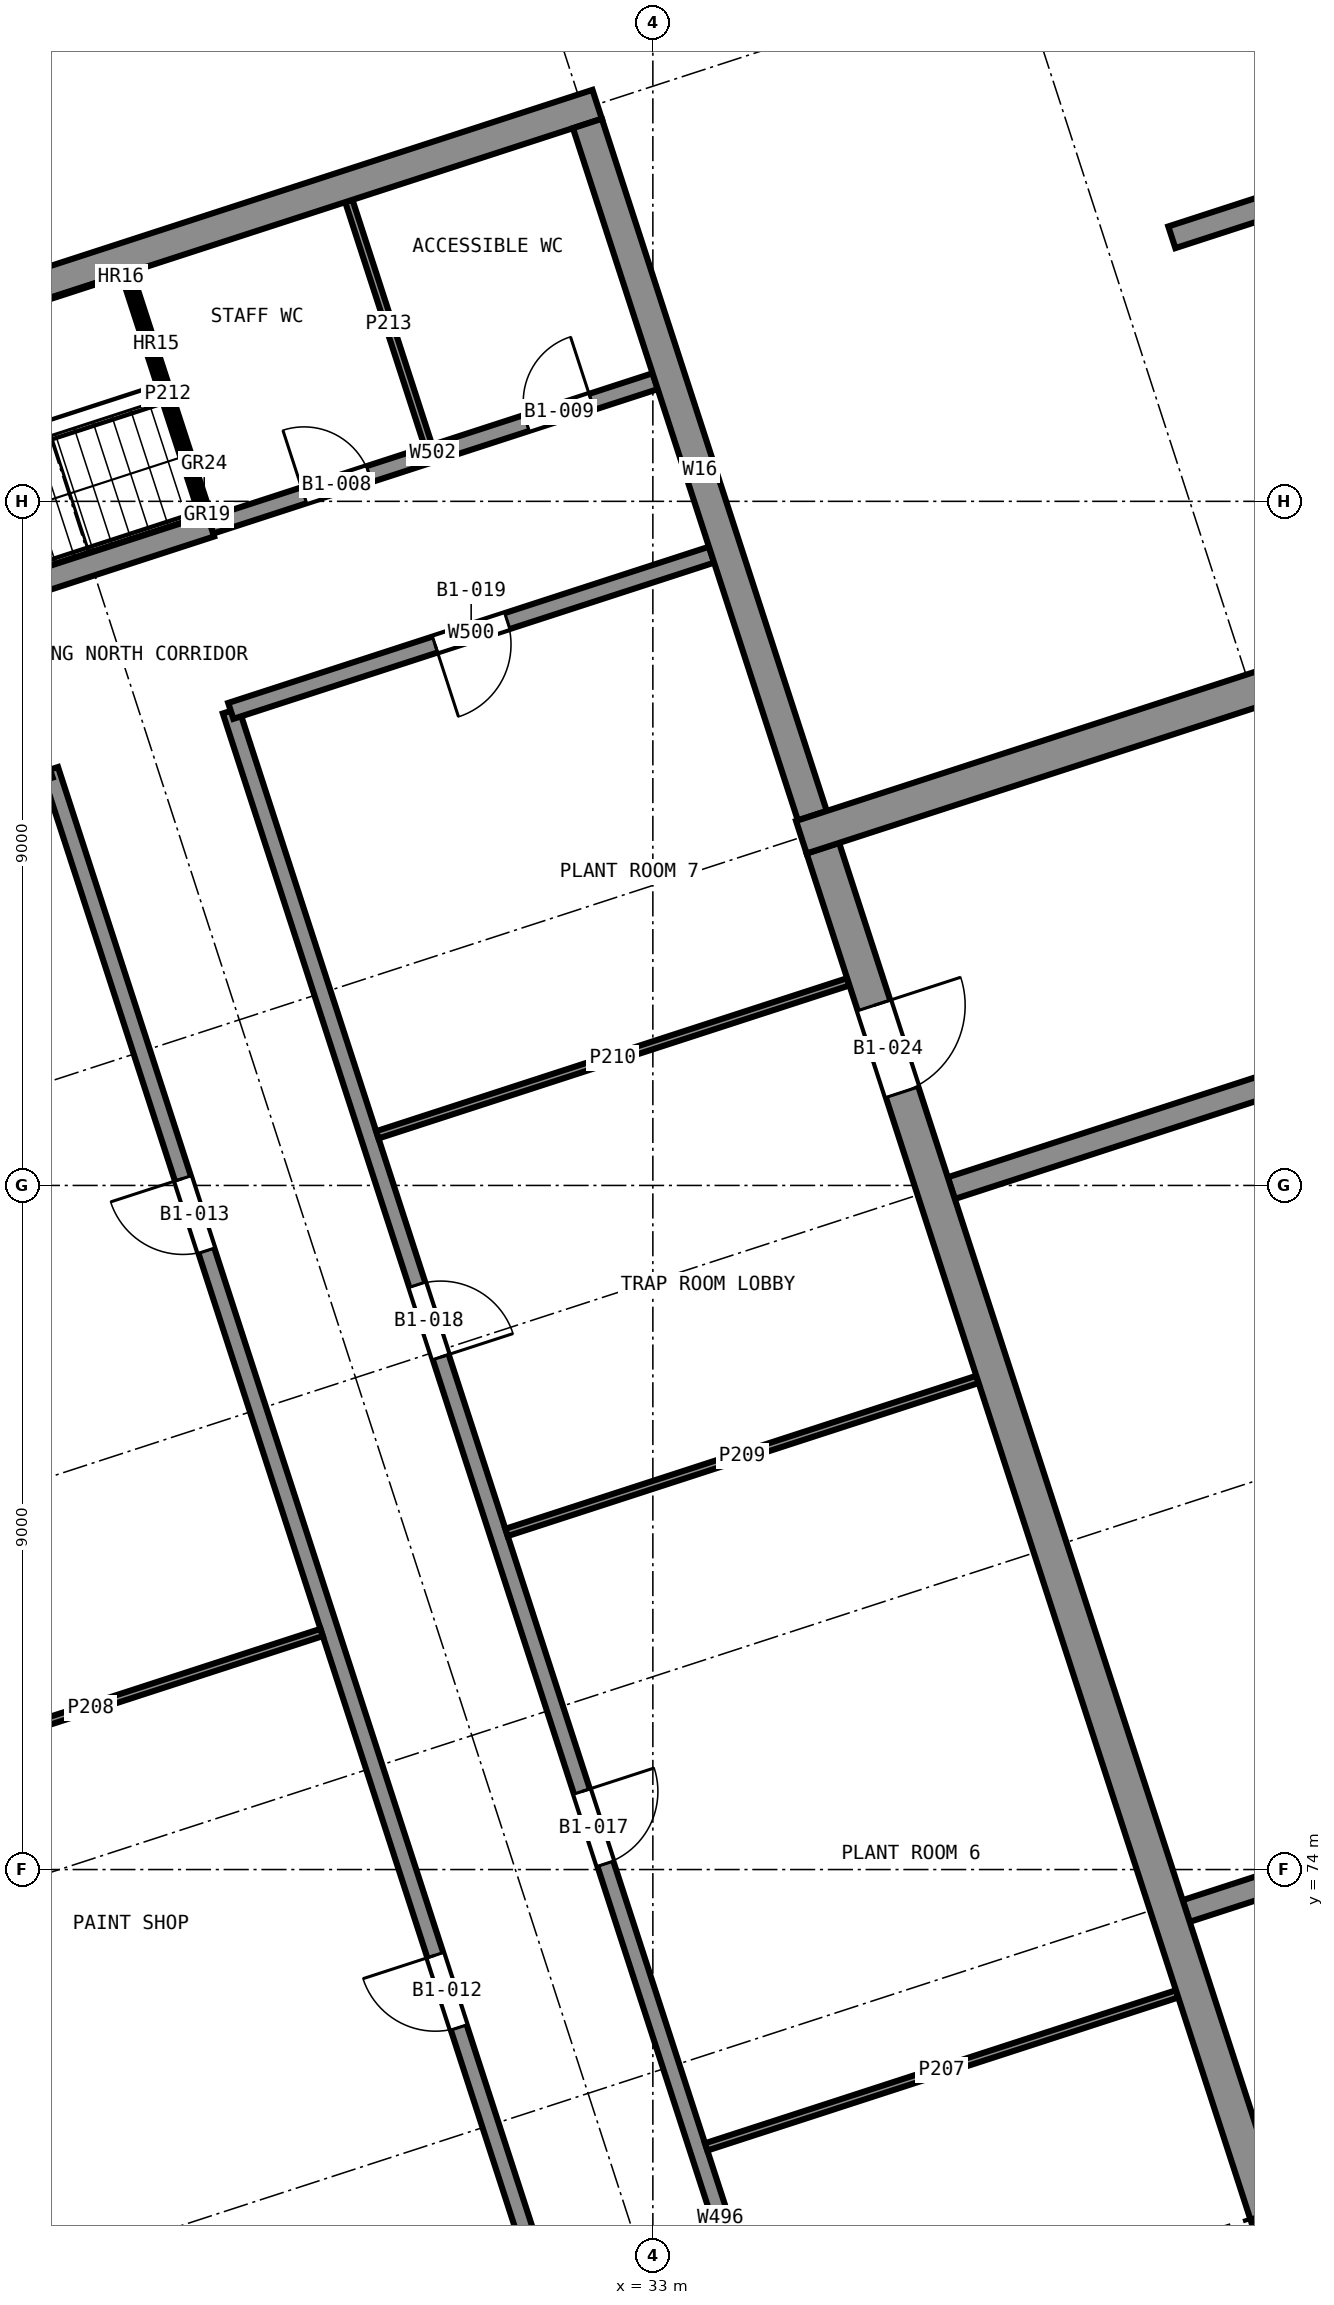
"""IFC4 building model, lengths in metres.
Left out: names, types, materials, properties, quantities, classifications, styles, units other than length and angle.
Written with IfcOpenShell. Run it as: python <this file> out.ifc"""

import sys

from ifc_helpers import new_model, si_unit, direction, frame, frame_2d, origin, place, context, subcontext, project, spatial, rectangle, extrude, element, fill, save


model = new_model("IFC4")
c1 = context("Model", 3, precision=1e-05, world=origin(), true_north=direction((0.0, 1.0)))
c2 = subcontext(c1, "Body", "Model", "MODEL_VIEW")
j1 = project(units=[si_unit("LENGTHUNIT", "METRE"), si_unit("PLANEANGLEUNIT", "RADIAN")], contexts=[c1])
p1 = place(None, origin())
s1 = spatial("IfcSite", under=j1, at=p1, CompositionType="ELEMENT")
p2 = place(p1, origin())
s2 = spatial("IfcBuilding", under=s1, at=p2, CompositionType="ELEMENT")
p3 = place(p2, frame((0.0, 0.0, -5.0)))
s3 = spatial("IfcBuildingStorey", under=s2, at=p3, CompositionType="ELEMENT", Elevation=-5.0)
p4 = place(p3, frame((49.93, 42.214, 0.0), z_axis=(0.0, 0.0, 1.0), x_axis=(-0.309013046462, 0.951057799041, 0.0)))
e1 = element("IfcWall", 1, at=p4, inside=s3, PredefinedType="SHEAR", context=c2, shape_type="SweptSolid", body=[
    extrude(rectangle(XDim=47.55, YDim=0.45, at=frame_2d((23.775, 0.0))), origin(), (0.0, 0.0, 1.0), 5.0),
])
p5 = place(p4, frame((11.775, 0.0, 0.0)))
e2 = element("IfcOpeningElement", 2, at=p5, cuts=e1, PredefinedType="OPENING", context=c2, shape_type="SweptSolid", body=[
    extrude(rectangle(XDim=1.2, YDim=2.1, at=frame_2d((0.6, 1.05))), frame((0.0, 0.235, 0.0), z_axis=(0.0, -1.0, 0.0), x_axis=(1.0, 0.0, 0.0)), (0.0, 0.0, 1.0), 0.47),
])
p6 = place(p4, frame((44.175, 0.0, 0.0)))
e3 = element("IfcOpeningElement", 3, at=p6, cuts=e1, PredefinedType="OPENING", context=c2, shape_type="SweptSolid", body=[
    extrude(rectangle(XDim=1.2, YDim=2.1, at=frame_2d((0.6, 1.05))), frame((0.0, 0.235, 0.0), z_axis=(0.0, -1.0, 0.0), x_axis=(1.0, 0.0, 0.0)), (0.0, 0.0, 1.0), 0.47),
])
p7 = place(p3, frame((34.953, 87.581, 0.0), z_axis=(0.0, 0.0, 1.0), x_axis=(0.951059165148, 0.309008841924, 0.0)))
e4 = element("IfcWall", 4, at=p7, inside=s3, PredefinedType="SHEAR", context=c2, shape_type="SweptSolid", body=[
    extrude(rectangle(XDim=29.45, YDim=0.45, at=frame_2d((14.725, 0.0))), origin(), (0.0, 0.0, 1.0), 5.0),
])
p8 = place(p3, frame((33.438, 41.035, 0.0), z_axis=(0.0, 0.0, 1.0), x_axis=(-0.309020156104, 0.951055488981, 0.0)))
e5 = element("IfcWall", 5, at=p8, inside=s3, PredefinedType="SOLIDWALL", context=c2, shape_type="SweptSolid", body=[
    extrude(rectangle(XDim=53.6, YDim=0.4, at=frame_2d((26.8, 0.0))), origin(), (0.0, 0.0, 1.0), 5.0),
])
p9 = place(p3, frame((16.622, 92.14, 0.0), z_axis=(0.0, 0.0, 1.0), x_axis=(0.951054352744, 0.30902365302, 0.0)))
e6 = element("IfcWall", 6, at=p9, inside=s3, PredefinedType="SOLIDWALL", context=c2, shape_type="SweptSolid", body=[
    extrude(rectangle(XDim=16.45, YDim=0.4, at=frame_2d((8.225, 0.0))), origin(), (0.0, 0.0, 1.0), 5.0),
])
p10 = place(p3, frame((32.139, 96.971, 0.0), z_axis=(0.0, 0.0, 1.0), x_axis=(0.30901284874, -0.951057863284, 0.0)))
e7 = element("IfcWall", 7, at=p10, inside=s3, PredefinedType="SOLIDWALL", context=c2, shape_type="SweptSolid", body=[
    extrude(rectangle(XDim=9.575, YDim=0.4, at=frame_2d((4.787, 0.0))), origin(), (0.0, 0.0, 1.0), 5.0),
])
p11 = place(p3, frame((27.181, 91.68, 0.0), z_axis=(0.0, 0.0, 1.0), x_axis=(-0.951051301895, -0.309033042189, 0.0)))
e8 = element("IfcWall", 8, at=p11, inside=s3, PredefinedType="SOLIDWALL", context=c2, shape_type="SweptSolid", body=[
    extrude(rectangle(XDim=6.35, YDim=0.3, at=frame_2d((3.175, 0.0))), origin(), (0.0, 0.0, 1.0), 4.6),
])
p12 = place(p11, frame((4.85, 0.0, 0.0)))
e9 = element("IfcOpeningElement", 9, at=p12, cuts=e8, PredefinedType="OPENING", context=c2, shape_type="SweptSolid", body=[
    extrude(rectangle(XDim=1.0, YDim=2.1, at=frame_2d((0.5, 1.05))), frame((0.0, 0.16, 0.0), z_axis=(0.0, -1.0, 0.0), x_axis=(1.0, 0.0, 0.0)), (0.0, 0.0, 1.0), 0.32),
])
for number, where, z_axis, x_axis in (
    (10, (40.016, 73.454, 0.0), (0.0, 0.0, 1.0), (0.951, 0.309, 0.0)),
    (11, (46.365, 86.032, 0.0), (0.0, 0.0, 1.0), (-0.951, -0.309, 0.0)),
):
    element("IfcWall", number, at=place(p3, frame(where, z_axis=z_axis, x_axis=x_axis)), inside=s3, PredefinedType="SOLIDWALL", context=c2, shape_type="SweptSolid", body=[
        extrude(rectangle(XDim=9.925, YDim=0.3, at=frame_2d((4.962, 0.0))), origin(), (0.0, 0.0, 1.0), 4.6),
    ])
p13 = place(p3, frame((37.956, 48.812, 0.0), z_axis=(0.0, 0.0, 1.0), x_axis=(-0.30901736393, 0.951056396219, 0.0)))
e12 = element("IfcWall", 12, at=p13, inside=s3, PredefinedType="SOLIDWALL", context=c2, shape_type="SweptSolid", body=[
    extrude(rectangle(XDim=41.7, YDim=0.22, at=frame_2d((20.85, 0.0))), origin(), (0.0, 0.0, 1.0), 4.6),
])
p14 = place(p13, frame((2.009, 0.0, 0.0)))
e13 = element("IfcOpeningElement", 13, at=p14, cuts=e12, PredefinedType="OPENING", context=c2, shape_type="SweptSolid", body=[
    extrude(rectangle(XDim=1.0, YDim=2.1, at=frame_2d((0.5, 1.05))), frame((0.0, 0.12, 0.0), z_axis=(0.0, -1.0, 0.0), x_axis=(1.0, 0.0, 0.0)), (0.0, 0.0, 1.0), 0.24),
])
p15 = place(p13, frame((11.495, 0.0, 0.0)))
e14 = element("IfcOpeningElement", 14, at=p15, cuts=e12, PredefinedType="OPENING", context=c2, shape_type="SweptSolid", body=[
    extrude(rectangle(XDim=1.0, YDim=2.1, at=frame_2d((0.5, 1.05))), frame((0.0, 0.12, 0.0), z_axis=(0.0, -1.0, 0.0), x_axis=(1.0, 0.0, 0.0)), (0.0, 0.0, 1.0), 0.24),
])
p16 = place(p13, frame((24.3, 0.0, 0.0)))
e15 = element("IfcOpeningElement", 15, at=p16, cuts=e12, PredefinedType="OPENING", context=c2, shape_type="SweptSolid", body=[
    extrude(rectangle(XDim=1.0, YDim=2.1, at=frame_2d((0.5, 1.05))), frame((0.0, 0.12, 0.0), z_axis=(0.0, -1.0, 0.0), x_axis=(1.0, 0.0, 0.0)), (0.0, 0.0, 1.0), 0.24),
])
p17 = place(p13, frame((35.045, 0.0, 0.0)))
e16 = element("IfcOpeningElement", 16, at=p17, cuts=e12, PredefinedType="OPENING", context=c2, shape_type="SweptSolid", body=[
    extrude(rectangle(XDim=1.0, YDim=2.1, at=frame_2d((0.5, 1.05))), frame((0.0, 0.12, 0.0), z_axis=(0.0, -1.0, 0.0), x_axis=(1.0, 0.0, 0.0)), (0.0, 0.0, 1.0), 0.24),
])
p18 = place(p3, frame((40.333, 49.584, 0.0), z_axis=(0.0, 0.0, 1.0), x_axis=(-0.309015643281, 0.951056955291, 0.0)))
e17 = element("IfcWall", 17, at=p18, inside=s3, PredefinedType="SOLIDWALL", context=c2, shape_type="SweptSolid", body=[
    extrude(rectangle(XDim=41.7, YDim=0.22, at=frame_2d((20.85, 0.0))), origin(), (0.0, 0.0, 1.0), 4.6),
])
p19 = place(p18, frame((2.0, 0.0, 0.0)))
e18 = element("IfcOpeningElement", 18, at=p19, cuts=e17, PredefinedType="OPENING", context=c2, shape_type="SweptSolid", body=[
    extrude(rectangle(XDim=1.0, YDim=2.1, at=frame_2d((0.5, 1.05))), frame((0.0, 0.12, 0.0), z_axis=(0.0, -1.0, 0.0), x_axis=(1.0, 0.0, 0.0)), (0.0, 0.0, 1.0), 0.24),
])
p20 = place(p18, frame((8.285, 0.0, 0.0)))
e19 = element("IfcOpeningElement", 19, at=p20, cuts=e17, PredefinedType="OPENING", context=c2, shape_type="SweptSolid", body=[
    extrude(rectangle(XDim=1.0, YDim=2.1, at=frame_2d((0.5, 1.05))), frame((0.0, 0.12, 0.0), z_axis=(0.0, -1.0, 0.0), x_axis=(1.0, 0.0, 0.0)), (0.0, 0.0, 1.0), 0.24),
])
p21 = place(p18, frame((16.475, 0.0, 0.0)))
e20 = element("IfcOpeningElement", 20, at=p21, cuts=e17, PredefinedType="OPENING", context=c2, shape_type="SweptSolid", body=[
    extrude(rectangle(XDim=1.0, YDim=2.1, at=frame_2d((0.5, 1.05))), frame((0.0, 0.12, 0.0), z_axis=(0.0, -1.0, 0.0), x_axis=(1.0, 0.0, 0.0)), (0.0, 0.0, 1.0), 0.24),
])
p22 = place(p18, frame((25.752, 0.0, 0.0)))
e21 = element("IfcOpeningElement", 21, at=p22, cuts=e17, PredefinedType="OPENING", context=c2, shape_type="SweptSolid", body=[
    extrude(rectangle(XDim=1.0, YDim=2.1, at=frame_2d((0.5, 1.05))), frame((0.0, 0.12, 0.0), z_axis=(0.0, -1.0, 0.0), x_axis=(1.0, 0.0, 0.0)), (0.0, 0.0, 1.0), 0.24),
])
p23 = place(p18, frame((32.761, 0.0, 0.0)))
e22 = element("IfcOpeningElement", 22, at=p23, cuts=e17, PredefinedType="OPENING", context=c2, shape_type="SweptSolid", body=[
    extrude(rectangle(XDim=1.0, YDim=2.1, at=frame_2d((0.5, 1.05))), frame((0.0, 0.12, 0.0), z_axis=(0.0, -1.0, 0.0), x_axis=(1.0, 0.0, 0.0)), (0.0, 0.0, 1.0), 0.24),
])
p24 = place(p3, frame((18.888, 86.462, 0.0), z_axis=(0.0, 0.0, 1.0), x_axis=(0.951059735424, 0.30900708674, 0.0)))
e23 = element("IfcWall", 23, at=p24, inside=s3, PredefinedType="SOLIDWALL", context=c2, shape_type="SweptSolid", body=[
    extrude(rectangle(XDim=6.5, YDim=0.22, at=frame_2d((3.25, 0.0))), origin(), (0.0, 0.0, 1.0), 4.6),
])
p25 = place(p3, frame((27.447, 89.243, 0.0), z_axis=(0.0, 0.0, 1.0), x_axis=(0.95105699893, 0.309015508975, 0.0)))
e24 = element("IfcWall", 24, at=p25, inside=s3, PredefinedType="SOLIDWALL", context=c2, shape_type="SweptSolid", body=[
    extrude(rectangle(XDim=6.65, YDim=0.22, at=frame_2d((3.325, 0.0))), origin(), (0.0, 0.0, 1.0), 4.6),
])
p26 = place(p25, frame((2.825, 0.0, 0.0)))
e25 = element("IfcOpeningElement", 25, at=p26, cuts=e24, PredefinedType="OPENING", context=c2, shape_type="SweptSolid", body=[
    extrude(rectangle(XDim=1.0, YDim=2.1, at=frame_2d((0.5, 1.05))), frame((0.0, 0.12, 0.0), z_axis=(0.0, -1.0, 0.0), x_axis=(1.0, 0.0, 0.0)), (0.0, 0.0, 1.0), 0.24),
])
p27 = place(p3, frame((27.181, 91.68, 0.0), z_axis=(0.0, 0.0, 1.0), x_axis=(0.951061487132, 0.309001695293, 0.0)))
e26 = element("IfcWall", 26, at=p27, inside=s3, PredefinedType="SOLIDWALL", context=c2, shape_type="SweptSolid", body=[
    extrude(rectangle(XDim=6.15, YDim=0.22, at=frame_2d((3.075, 0.0))), origin(), (0.0, 0.0, 1.0), 4.6),
])
p28 = place(p27, frame((1.293, 0.0, 0.0)))
e27 = element("IfcOpeningElement", 27, at=p28, cuts=e26, PredefinedType="OPENING", context=c2, shape_type="SweptSolid", body=[
    extrude(rectangle(XDim=0.9, YDim=2.1, at=frame_2d((0.45, 1.05))), frame((0.0, 0.12, 0.0), z_axis=(0.0, -1.0, 0.0), x_axis=(1.0, 0.0, 0.0)), (0.0, 0.0, 1.0), 0.24),
])
p29 = place(p27, frame((4.371, 0.0, 0.0)))
e28 = element("IfcOpeningElement", 28, at=p29, cuts=e26, PredefinedType="OPENING", context=c2, shape_type="SweptSolid", body=[
    extrude(rectangle(XDim=0.9, YDim=2.1, at=frame_2d((0.45, 1.05))), frame((0.0, 0.12, 0.0), z_axis=(0.0, -1.0, 0.0), x_axis=(1.0, 0.0, 0.0)), (0.0, 0.0, 1.0), 0.24),
])
p30 = place(p3, frame((33.701, 70.351, 0.0), z_axis=(0.0, 0.0, 1.0), x_axis=(0.951058024796, 0.309012351648, 0.0)))
e29 = element("IfcWall", 29, at=p30, inside=s3, PredefinedType="PARTITIONING", context=c2, shape_type="SweptSolid", body=[
    extrude(rectangle(XDim=6.515, YDim=0.1, at=frame_2d((3.257, 0.0))), origin(), (0.0, 0.0, 1.0), 4.6),
])
p31 = place(p3, frame((22.565, 75.144, 0.0), z_axis=(0.0, 0.0, 1.0), x_axis=(0.951055405517, 0.309020412977, 0.0)))
e30 = element("IfcWall", 30, at=p31, inside=s3, PredefinedType="PARTITIONING", context=c2, shape_type="SweptSolid", body=[
    extrude(rectangle(XDim=6.39, YDim=0.1, at=frame_2d((3.195, 0.0))), origin(), (0.0, 0.0, 1.0), 4.6),
])
p32 = place(p3, frame((31.075, 78.435, 0.0), z_axis=(0.0, 0.0, 1.0), x_axis=(0.951058024796, 0.309012351648, 0.0)))
e31 = element("IfcWall", 31, at=p32, inside=s3, PredefinedType="PARTITIONING", context=c2, shape_type="SweptSolid", body=[
    extrude(rectangle(XDim=6.515, YDim=0.1, at=frame_2d((3.257, 0.0))), origin(), (0.0, 0.0, 1.0), 4.6),
])
p33 = place(p3, frame((29.375, 83.666, 0.0), z_axis=(0.0, 0.0, 1.0), x_axis=(0.951061602966, 0.309001338773, 0.0)))
e32 = element("IfcWall", 32, at=p33, inside=s3, PredefinedType="PARTITIONING", context=c2, shape_type="SweptSolid", body=[
    extrude(rectangle(XDim=6.515, YDim=0.1, at=frame_2d((3.258, 0.0))), origin(), (0.0, 0.0, 1.0), 4.6),
])
p34 = place(p3, frame((27.135, 91.823, 0.0), z_axis=(0.0, 0.0, 1.0), x_axis=(-0.309003676349, 0.951060843481, 0.0)))
e33 = element("IfcWall", 33, at=p34, inside=s3, PredefinedType="PARTITIONING", context=c2, shape_type="SweptSolid", body=[
    extrude(rectangle(XDim=3.35, YDim=0.1, at=frame_2d((1.675, 0.0))), origin(), (0.0, 0.0, 1.0), 4.6),
])
p35 = place(p3, frame((30.048, 92.727, 0.0), z_axis=(0.0, 0.0, 1.0), x_axis=(-0.309024191767, 0.951054177691, 0.0)))
e34 = element("IfcWall", 34, at=p35, inside=s3, PredefinedType="PARTITIONING", context=c2, shape_type="SweptSolid", body=[
    extrude(rectangle(XDim=3.39, YDim=0.1, at=frame_2d((1.695, 0.0))), origin(), (0.0, 0.0, 1.0), 4.6),
])
p36 = place(p3, frame((39.828, 95.474, 0.0), z_axis=(0.0, 0.0, 1.0), x_axis=(0.951058391285, 0.309011223689, 0.0)))
e35 = element("IfcWall", 35, at=p36, inside=s3, PredefinedType="SOLIDWALL", context=c2, shape_type="SweptSolid", body=[
    extrude(rectangle(XDim=16.3, YDim=0.3, at=frame_2d((8.15, 0.0))), origin(), (0.0, 0.0, 1.0), 5.0),
])
p37 = place(p28, origin())
e36 = element("IfcDoor", 36, at=p37, inside=s3, OperationType="SINGLE_SWING_RIGHT", PredefinedType="DOOR", context=c2, shape_type="SweptSolid", body=[
    extrude(rectangle(XDim=0.9, YDim=2.1, at=frame_2d((0.45, 1.05))), frame((0.0, 0.025, 0.0), z_axis=(0.0, -1.0, 0.0), x_axis=(1.0, 0.0, 0.0)), (0.0, 0.0, 1.0), 0.05),
])
fill(e27, e36)
p38 = place(p29, origin())
e37 = element("IfcDoor", 37, at=p38, inside=s3, OperationType="SINGLE_SWING_LEFT", PredefinedType="DOOR", context=c2, shape_type="SweptSolid", body=[
    extrude(rectangle(XDim=0.9, YDim=2.1, at=frame_2d((0.45, 1.05))), frame((0.0, 0.025, 0.0), z_axis=(0.0, -1.0, 0.0), x_axis=(1.0, 0.0, 0.0)), (0.0, 0.0, 1.0), 0.05),
])
fill(e28, e37)
p39 = place(p16, origin())
e38 = element("IfcDoor", 38, at=p39, inside=s3, OperationType="SINGLE_SWING_LEFT", PredefinedType="DOOR", context=c2, shape_type="SweptSolid", body=[
    extrude(rectangle(XDim=1.0, YDim=2.1, at=frame_2d((0.5, 1.05))), frame((0.0, 0.025, 0.0), z_axis=(0.0, -1.0, 0.0), x_axis=(1.0, 0.0, 0.0)), (0.0, 0.0, 1.0), 0.05),
])
fill(e15, e38)
p40 = place(p17, origin())
e39 = element("IfcDoor", 39, at=p40, inside=s3, OperationType="SINGLE_SWING_LEFT", PredefinedType="DOOR", context=c2, shape_type="SweptSolid", body=[
    extrude(rectangle(XDim=1.0, YDim=2.1, at=frame_2d((0.5, 1.05))), frame((0.0, 0.025, 0.0), z_axis=(0.0, -1.0, 0.0), x_axis=(1.0, 0.0, 0.0)), (0.0, 0.0, 1.0), 0.05),
])
fill(e16, e39)
p41 = place(p22, frame((1.0, 0.0, 0.0), z_axis=(0.0, 0.0, 1.0), x_axis=(-1.0, 0.0, 0.0)))
e40 = element("IfcDoor", 40, at=p41, inside=s3, OperationType="SINGLE_SWING_RIGHT", PredefinedType="DOOR", context=c2, shape_type="SweptSolid", body=[
    extrude(rectangle(XDim=1.0, YDim=2.1, at=frame_2d((0.5, 1.05))), frame((0.0, 0.025, 0.0), z_axis=(0.0, -1.0, 0.0), x_axis=(1.0, 0.0, 0.0)), (0.0, 0.0, 1.0), 0.05),
])
fill(e21, e40)
p42 = place(p23, frame((1.0, 0.0, 0.0), z_axis=(0.0, 0.0, 1.0), x_axis=(-1.0, 0.0, 0.0)))
e41 = element("IfcDoor", 41, at=p42, inside=s3, OperationType="SINGLE_SWING_LEFT", PredefinedType="DOOR", context=c2, shape_type="SweptSolid", body=[
    extrude(rectangle(XDim=1.0, YDim=2.1, at=frame_2d((0.5, 1.05))), frame((0.0, 0.025, 0.0), z_axis=(0.0, -1.0, 0.0), x_axis=(1.0, 0.0, 0.0)), (0.0, 0.0, 1.0), 0.05),
])
fill(e22, e41)
p43 = place(p26, frame((1.0, 0.0, 0.0), z_axis=(0.0, 0.0, 1.0), x_axis=(-1.0, 0.0, 0.0)))
e42 = element("IfcDoor", 42, at=p43, inside=s3, OperationType="SINGLE_SWING_LEFT", PredefinedType="DOOR", context=c2, shape_type="SweptSolid", body=[
    extrude(rectangle(XDim=1.0, YDim=2.1, at=frame_2d((0.5, 1.05))), frame((0.0, 0.025, 0.0), z_axis=(0.0, -1.0, 0.0), x_axis=(1.0, 0.0, 0.0)), (0.0, 0.0, 1.0), 0.05),
])
fill(e25, e42)
p44 = place(p6, frame((1.2, 0.0, 0.0), z_axis=(0.0, 0.0, 1.0), x_axis=(-1.0, 0.0, 0.0)))
e43 = element("IfcDoor", 43, at=p44, inside=s3, OperationType="SINGLE_SWING_RIGHT", PredefinedType="DOOR", context=c2, shape_type="SweptSolid", body=[
    extrude(rectangle(XDim=1.2, YDim=2.1, at=frame_2d((0.6, 1.05))), frame((0.0, 0.025, 0.0), z_axis=(0.0, -1.0, 0.0), x_axis=(1.0, 0.0, 0.0)), (0.0, 0.0, 1.0), 0.05),
])
fill(e3, e43)
save(model, sys.argv[1])
